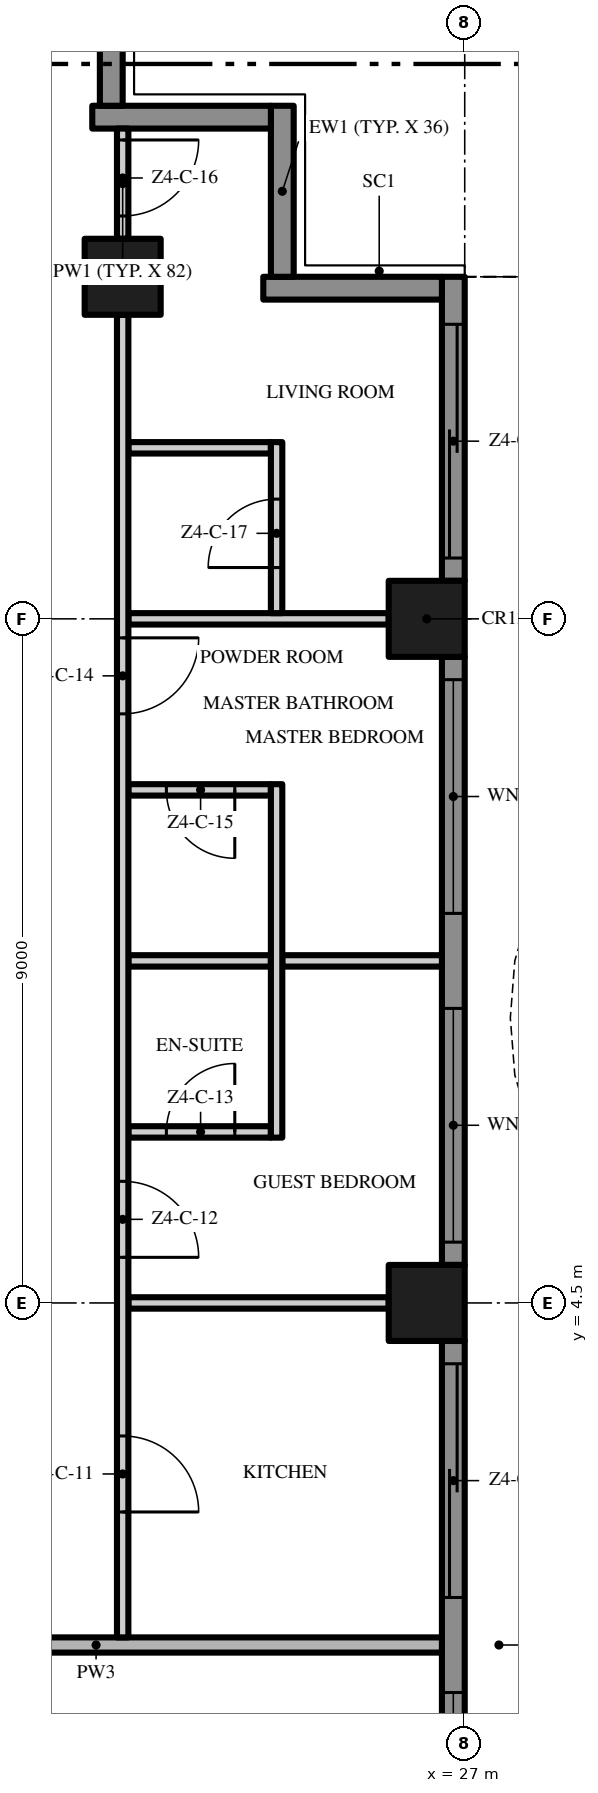
"""IFC4 building model, lengths in metres.
Left out: names, types, materials, properties, quantities, classifications, styles, units other than length and angle.
Written with IfcOpenShell. Run it as: python <this file> out.ifc"""

import sys

from ifc_helpers import new_model, si_unit, direction, frame, frame_2d, origin, origin_2d, place, context, subcontext, project, spatial, polyline, rectangle, outline, extrude, element, fill, save


model = new_model("IFC4")
c1 = context("Model", 3, precision=1e-05, world=origin(), true_north=direction((0.0, 1.0)))
c2 = subcontext(c1, "Body", "Model", "MODEL_VIEW")
j1 = project(units=[si_unit("LENGTHUNIT", "METRE"), si_unit("PLANEANGLEUNIT", "RADIAN")], contexts=[c1])
p1 = place(None, origin())
s1 = spatial("IfcSite", under=j1, at=p1, CompositionType="ELEMENT")
p2 = place(p1, origin())
s2 = spatial("IfcBuilding", under=s1, at=p2, CompositionType="ELEMENT")
p3 = place(p2, frame((0.0, 0.0, 211.0)))
s3 = spatial("IfcBuildingStorey", under=s2, at=p3, CompositionType="ELEMENT", Elevation=211.0)
for number, where, z_axis, x_axis in (
    (1, (26.5, 13.5, 0.0), (0.0, 0.0, 1.0), (1.0, 0.0, 0.0)),
    (2, (22.5, 18.0, 0.0), (0.0, 0.0, 1.0), (1.0, 0.0, 0.0)),
    (3, (26.5, 4.5, 0.0), (0.0, 0.0, 1.0), (1.0, 0.0, 0.0)),
):
    element("IfcColumn", number, at=place(p3, frame(where, z_axis=z_axis, x_axis=x_axis)), inside=s3, PredefinedType="COLUMN", context=c2, shape_type="SweptSolid", body=[
        extrude(rectangle(XDim=1.0, YDim=1.0, at=origin_2d()), origin(), (0.0, 0.0, 1.0), 3.5),
    ])
p4 = place(p3, frame((26.85, 4.0, 0.0), z_axis=(0.0, 0.0, 1.0), x_axis=(0.0, -1.0, 0.0)))
e4 = element("IfcWall", 4, at=p4, inside=s3, PredefinedType="SOLIDWALL", context=c2, shape_type="SweptSolid", body=[
    extrude(rectangle(XDim=8.0, YDim=0.3, at=frame_2d((4.0, 0.0))), origin(), (0.0, 0.0, 1.0), 3.5),
])
p5 = place(p4, frame((4.625, 0.0, 0.45)))
e5 = element("IfcOpeningElement", 5, at=p5, cuts=e4, PredefinedType="OPENING", context=c2, shape_type="SweptSolid", body=[
    extrude(rectangle(XDim=3.075, YDim=2.65, at=frame_2d((1.538, 1.325))), frame((0.0, 0.16, 0.0), z_axis=(0.0, -1.0, 0.0), x_axis=(1.0, 0.0, 0.0)), (0.0, 0.0, 1.0), 0.32),
])
p6 = place(p4, frame((0.3, 0.0, 0.0)))
e6 = element("IfcOpeningElement", 6, at=p6, cuts=e4, PredefinedType="OPENING", context=c2, shape_type="SweptSolid", body=[
    extrude(rectangle(XDim=3.075, YDim=2.4, at=frame_2d((1.538, 1.2))), frame((0.0, 0.16, 0.0), z_axis=(0.0, -1.0, 0.0), x_axis=(1.0, 0.0, 0.0)), (0.0, 0.0, 1.0), 0.32),
])
p7 = place(p3, frame((26.85, 13.0, 0.0), z_axis=(0.0, 0.0, 1.0), x_axis=(0.0, -1.0, 0.0)))
e7 = element("IfcWall", 7, at=p7, inside=s3, PredefinedType="SOLIDWALL", context=c2, shape_type="SweptSolid", body=[
    extrude(rectangle(XDim=8.0, YDim=0.3, at=frame_2d((4.0, 0.0))), origin(), (0.0, 0.0, 1.0), 3.5),
])
p8 = place(p7, frame((4.625, 0.0, 0.45)))
e8 = element("IfcOpeningElement", 8, at=p8, cuts=e7, PredefinedType="OPENING", context=c2, shape_type="SweptSolid", body=[
    extrude(rectangle(XDim=3.075, YDim=2.65, at=frame_2d((1.538, 1.325))), frame((0.0, 0.16, 0.0), z_axis=(0.0, -1.0, 0.0), x_axis=(1.0, 0.0, 0.0)), (0.0, 0.0, 1.0), 0.32),
])
p9 = place(p7, frame((0.3, 0.0, 0.45)))
e9 = element("IfcOpeningElement", 9, at=p9, cuts=e7, PredefinedType="OPENING", context=c2, shape_type="SweptSolid", body=[
    extrude(rectangle(XDim=3.075, YDim=2.65, at=frame_2d((1.538, 1.325))), frame((0.0, 0.16, 0.0), z_axis=(0.0, -1.0, 0.0), x_axis=(1.0, 0.0, 0.0)), (0.0, 0.0, 1.0), 0.32),
])
p10 = place(p3, frame((26.85, 18.0, 0.0), z_axis=(0.0, 0.0, 1.0), x_axis=(0.0, -1.0, 0.0)))
e10 = element("IfcWall", 10, at=p10, inside=s3, PredefinedType="SOLIDWALL", context=c2, shape_type="SweptSolid", body=[
    extrude(rectangle(XDim=4.0, YDim=0.3, at=frame_2d((2.0, 0.0))), origin(), (0.0, 0.0, 1.0), 3.5),
])
p11 = place(p10, frame((0.625, 0.0, 0.0)))
e11 = element("IfcOpeningElement", 11, at=p11, cuts=e10, PredefinedType="OPENING", context=c2, shape_type="SweptSolid", body=[
    extrude(rectangle(XDim=3.075, YDim=2.4, at=frame_2d((1.538, 1.2))), frame((0.0, 0.16, 0.0), z_axis=(0.0, -1.0, 0.0), x_axis=(1.0, 0.0, 0.0)), (0.0, 0.0, 1.0), 0.32),
])
p12 = place(p3, frame((24.35, 17.85, 0.0), z_axis=(0.0, 0.0, 1.0), x_axis=(1.0, 0.0, 0.0)))
e12 = element("IfcWall", 12, at=p12, inside=s3, PredefinedType="SOLIDWALL", context=c2, shape_type="SweptSolid", body=[
    extrude(rectangle(XDim=2.35, YDim=0.3, at=frame_2d((1.175, 0.0))), origin(), (0.0, 0.0, 1.0), 3.5),
])
p13 = place(p3, frame((24.6, 20.25, 0.0), z_axis=(0.0, 0.0, 1.0), x_axis=(0.0, -1.0, 0.0)))
e13 = element("IfcWall", 13, at=p13, inside=s3, PredefinedType="SOLIDWALL", context=c2, shape_type="SweptSolid", body=[
    extrude(rectangle(XDim=2.25, YDim=0.3, at=frame_2d((1.125, 0.0))), origin(), (0.0, 0.0, 1.0), 3.5),
])
p14 = place(p3, frame((22.1, 20.1, 0.0), z_axis=(0.0, 0.0, 1.0), x_axis=(1.0, 0.0, 0.0)))
e14 = element("IfcWall", 14, at=p14, inside=s3, PredefinedType="SOLIDWALL", context=c2, shape_type="SweptSolid", body=[
    extrude(rectangle(XDim=2.35, YDim=0.3, at=frame_2d((1.175, 0.0))), origin(), (0.0, 0.0, 1.0), 3.5),
])
p15 = place(p3, frame((22.35, 22.5, 0.0), z_axis=(0.0, 0.0, 1.0), x_axis=(0.0, -1.0, 0.0)))
e15 = element("IfcWall", 15, at=p15, inside=s3, PredefinedType="SOLIDWALL", context=c2, shape_type="SweptSolid", body=[
    extrude(rectangle(XDim=2.25, YDim=0.3, at=frame_2d((1.125, 0.0))), origin(), (0.0, 0.0, 1.0), 3.5),
])
p16 = place(p3, origin())
e16 = element("IfcWall", 16, at=p16, inside=s3, PredefinedType="USERDEFINED", context=c2, shape_type="SweptSolid", body=[
    extrude(outline(polyline([(28.8, -18.0), (29.505, -16.5), (29.941, -15.0), (30.0, -14.25), (29.941, -13.5), (29.505, -12.0), (28.8, -10.5), (28.095, -9.0), (27.659, -7.5), (27.6, -6.75), (27.659, -6.0), (28.095, -4.5), (28.8, -3.0), (29.505, -1.5), (29.941, 0.0), (30.0, 0.75), (29.941, 1.5), (29.505, 3.0), (28.8, 4.5), (28.095, 6.0), (27.659, 7.5), (27.6, 8.25), (27.659, 9.0), (28.095, 10.5), (28.8, 12.0), (29.505, 13.5), (29.941, 15.0), (30.0, 15.75), (29.941, 16.5), (29.505, 18.0), (29.265, 17.93), (29.694, 16.455), (29.749, 15.75), (29.694, 15.045), (29.271, 13.589), (28.574, 12.106), (27.86, 10.589), (27.411, 9.045), (27.349, 8.25), (27.411, 7.455), (27.86, 5.911), (28.574, 4.394), (29.271, 2.911), (29.694, 1.455), (29.749, 0.75), (29.694, 0.045), (29.271, -1.411), (28.574, -2.894), (27.86, -4.411), (27.411, -5.955), (27.349, -6.75), (27.411, -7.545), (27.86, -9.089), (28.574, -10.606), (29.271, -12.089), (29.694, -13.545), (29.749, -14.25), (29.694, -14.955), (29.271, -16.411), (28.574, -17.894), (28.8, -18.0)])), origin(), (0.0, 0.0, 1.0), 0.9),
])
p17 = place(p3, frame((17.6, 0.0, 0.0), z_axis=(0.0, 0.0, 1.0), x_axis=(1.0, 0.0, 0.0)))
e17 = element("IfcWall", 17, at=p17, inside=s3, PredefinedType="PARTITIONING", context=c2, shape_type="SweptSolid", body=[
    extrude(rectangle(XDim=9.1, YDim=0.2, at=frame_2d((4.55, 0.0))), origin(), (0.0, 0.0, 1.0), 3.5),
])
p18 = place(p3, frame((22.575, 4.5, 0.0), z_axis=(0.0, 0.0, 1.0), x_axis=(1.0, 0.0, 0.0)))
e18 = element("IfcWall", 18, at=p18, inside=s3, PredefinedType="PARTITIONING", context=c2, shape_type="SweptSolid", body=[
    extrude(rectangle(XDim=3.425, YDim=0.15, at=frame_2d((1.712, 0.0))), origin(), (0.0, 0.0, 1.0), 3.5),
])
p19 = place(p3, frame((22.575, 6.75, 0.0), z_axis=(0.0, 0.0, 1.0), x_axis=(1.0, 0.0, 0.0)))
e19 = element("IfcWall", 19, at=p19, inside=s3, PredefinedType="PARTITIONING", context=c2, shape_type="SweptSolid", body=[
    extrude(rectangle(XDim=1.875, YDim=0.15, at=frame_2d((0.938, 0.0))), origin(), (0.0, 0.0, 1.0), 3.5),
])
p20 = place(p19, frame((0.5, 0.0, 0.0)))
e20 = element("IfcOpeningElement", 20, at=p20, cuts=e19, PredefinedType="OPENING", context=c2, shape_type="SweptSolid", body=[
    extrude(rectangle(XDim=0.9, YDim=2.1, at=frame_2d((0.45, 1.05))), frame((0.0, 0.085, 0.0), z_axis=(0.0, -1.0, 0.0), x_axis=(1.0, 0.0, 0.0)), (0.0, 0.0, 1.0), 0.17),
])
p21 = place(p3, frame((22.575, 9.0, 0.0), z_axis=(0.0, 0.0, 1.0), x_axis=(1.0, 0.0, 0.0)))
e21 = element("IfcWall", 21, at=p21, inside=s3, PredefinedType="PARTITIONING", context=c2, shape_type="SweptSolid", body=[
    extrude(rectangle(XDim=1.875, YDim=0.15, at=frame_2d((0.938, 0.0))), origin(), (0.0, 0.0, 1.0), 3.5),
])
p22 = place(p3, frame((24.6, 9.0, 0.0), z_axis=(0.0, 0.0, 1.0), x_axis=(1.0, 0.0, 0.0)))
e22 = element("IfcWall", 22, at=p22, inside=s3, PredefinedType="PARTITIONING", context=c2, shape_type="SweptSolid", body=[
    extrude(rectangle(XDim=2.1, YDim=0.15, at=frame_2d((1.05, 0.0))), origin(), (0.0, 0.0, 1.0), 3.5),
])
p23 = place(p3, frame((24.45, 11.25, 0.0), z_axis=(0.0, 0.0, 1.0), x_axis=(-1.0, 0.0, 0.0)))
e23 = element("IfcWall", 23, at=p23, inside=s3, PredefinedType="PARTITIONING", context=c2, shape_type="SweptSolid", body=[
    extrude(rectangle(XDim=1.875, YDim=0.15, at=frame_2d((0.938, 0.0))), origin(), (0.0, 0.0, 1.0), 3.5),
])
p24 = place(p23, frame((0.475, 0.0, 0.0)))
e24 = element("IfcOpeningElement", 24, at=p24, cuts=e23, PredefinedType="OPENING", context=c2, shape_type="SweptSolid", body=[
    extrude(rectangle(XDim=0.9, YDim=2.1, at=frame_2d((0.45, 1.05))), frame((0.0, 0.085, 0.0), z_axis=(0.0, -1.0, 0.0), x_axis=(1.0, 0.0, 0.0)), (0.0, 0.0, 1.0), 0.17),
])
p25 = place(p3, frame((22.575, 13.5, 0.0), z_axis=(0.0, 0.0, 1.0), x_axis=(1.0, 0.0, 0.0)))
e25 = element("IfcWall", 25, at=p25, inside=s3, PredefinedType="PARTITIONING", context=c2, shape_type="SweptSolid", body=[
    extrude(rectangle(XDim=3.425, YDim=0.15, at=frame_2d((1.712, 0.0))), origin(), (0.0, 0.0, 1.0), 3.5),
])
p26 = place(p3, frame((22.575, 15.75, 0.0), z_axis=(0.0, 0.0, 1.0), x_axis=(1.0, 0.0, 0.0)))
e26 = element("IfcWall", 26, at=p26, inside=s3, PredefinedType="PARTITIONING", context=c2, shape_type="SweptSolid", body=[
    extrude(rectangle(XDim=1.875, YDim=0.15, at=frame_2d((0.938, 0.0))), origin(), (0.0, 0.0, 1.0), 3.5),
])
p27 = place(p3, frame((22.5, 17.5, 0.0), z_axis=(0.0, 0.0, 1.0), x_axis=(0.0, -1.0, 0.0)))
e27 = element("IfcWall", 27, at=p27, inside=s3, PredefinedType="PARTITIONING", context=c2, shape_type="SweptSolid", body=[
    extrude(rectangle(XDim=17.4, YDim=0.15, at=frame_2d((8.7, 0.0))), origin(), (0.0, 0.0, 1.0), 3.5),
])
p28 = place(p27, frame((14.75, 0.0, 0.0)))
e28 = element("IfcOpeningElement", 28, at=p28, cuts=e27, PredefinedType="OPENING", context=c2, shape_type="SweptSolid", body=[
    extrude(rectangle(XDim=1.0, YDim=2.4, at=frame_2d((0.5, 1.2))), frame((0.0, 0.085, 0.0), z_axis=(0.0, -1.0, 0.0), x_axis=(1.0, 0.0, 0.0)), (0.0, 0.0, 1.0), 0.17),
])
p29 = place(p27, frame((11.4, 0.0, 0.0)))
e29 = element("IfcOpeningElement", 29, at=p29, cuts=e27, PredefinedType="OPENING", context=c2, shape_type="SweptSolid", body=[
    extrude(rectangle(XDim=1.0, YDim=2.4, at=frame_2d((0.5, 1.2))), frame((0.0, 0.085, 0.0), z_axis=(0.0, -1.0, 0.0), x_axis=(1.0, 0.0, 0.0)), (0.0, 0.0, 1.0), 0.17),
])
p30 = place(p27, frame((4.25, 0.0, 0.0)))
e30 = element("IfcOpeningElement", 30, at=p30, cuts=e27, PredefinedType="OPENING", context=c2, shape_type="SweptSolid", body=[
    extrude(rectangle(XDim=1.0, YDim=2.4, at=frame_2d((0.5, 1.2))), frame((0.0, 0.085, 0.0), z_axis=(0.0, -1.0, 0.0), x_axis=(1.0, 0.0, 0.0)), (0.0, 0.0, 1.0), 0.17),
])
p31 = place(p3, frame((22.5, 19.95, 0.0), z_axis=(0.0, 0.0, 1.0), x_axis=(0.0, -1.0, 0.0)))
e31 = element("IfcWall", 31, at=p31, inside=s3, PredefinedType="PARTITIONING", context=c2, shape_type="SweptSolid", body=[
    extrude(rectangle(XDim=1.45, YDim=0.15, at=frame_2d((0.725, 0.0))), origin(), (0.0, 0.0, 1.0), 3.5),
])
p32 = place(p31, frame((0.15, 0.0, 0.0)))
e32 = element("IfcOpeningElement", 32, at=p32, cuts=e31, PredefinedType="OPENING", context=c2, shape_type="SweptSolid", body=[
    extrude(rectangle(XDim=1.0, YDim=2.4, at=frame_2d((0.5, 1.2))), frame((0.0, 0.085, 0.0), z_axis=(0.0, -1.0, 0.0), x_axis=(1.0, 0.0, 0.0)), (0.0, 0.0, 1.0), 0.17),
])
p33 = place(p3, frame((24.525, 6.675, 0.0), z_axis=(0.0, 0.0, 1.0), x_axis=(0.0, 1.0, 0.0)))
e33 = element("IfcWall", 33, at=p33, inside=s3, PredefinedType="PARTITIONING", context=c2, shape_type="SweptSolid", body=[
    extrude(rectangle(XDim=4.65, YDim=0.15, at=frame_2d((2.325, 0.0))), origin(), (0.0, 0.0, 1.0), 3.5),
])
p34 = place(p3, frame((24.525, 13.575, 0.0), z_axis=(0.0, 0.0, 1.0), x_axis=(0.0, 1.0, 0.0)))
e34 = element("IfcWall", 34, at=p34, inside=s3, PredefinedType="PARTITIONING", context=c2, shape_type="SweptSolid", body=[
    extrude(rectangle(XDim=2.25, YDim=0.15, at=frame_2d((1.125, 0.0))), origin(), (0.0, 0.0, 1.0), 3.5),
])
p35 = place(p34, frame((0.6, 0.0, 0.0)))
e35 = element("IfcOpeningElement", 35, at=p35, cuts=e34, PredefinedType="OPENING", context=c2, shape_type="SweptSolid", body=[
    extrude(rectangle(XDim=0.9, YDim=2.1, at=frame_2d((0.45, 1.05))), frame((0.0, 0.085, 0.0), z_axis=(0.0, -1.0, 0.0), x_axis=(1.0, 0.0, 0.0)), (0.0, 0.0, 1.0), 0.17),
])
p36 = place(p5, origin())
e36 = element("IfcWindow", 36, at=p36, inside=s3, PartitioningType="SINGLE_PANEL", PredefinedType="WINDOW", context=c2, shape_type="SweptSolid", body=[
    extrude(rectangle(XDim=3.075, YDim=2.65, at=frame_2d((1.538, 1.325))), frame((0.0, 0.03, 0.0), z_axis=(0.0, -1.0, 0.0), x_axis=(1.0, 0.0, 0.0)), (0.0, 0.0, 1.0), 0.06),
])
fill(e5, e36)
p37 = place(p6, origin())
e37 = element("IfcDoor", 37, at=p37, inside=s3, OperationType="SINGLE_SWING_LEFT", PredefinedType="DOOR", context=c2, shape_type="SweptSolid", body=[
    extrude(rectangle(XDim=3.075, YDim=2.4, at=frame_2d((1.538, 1.2))), frame((0.0, 0.025, 0.0), z_axis=(0.0, -1.0, 0.0), x_axis=(1.0, 0.0, 0.0)), (0.0, 0.0, 1.0), 0.05),
])
fill(e6, e37)
p38 = place(p8, origin())
e38 = element("IfcWindow", 38, at=p38, inside=s3, PartitioningType="SINGLE_PANEL", PredefinedType="WINDOW", context=c2, shape_type="SweptSolid", body=[
    extrude(rectangle(XDim=3.075, YDim=2.65, at=frame_2d((1.538, 1.325))), frame((0.0, 0.03, 0.0), z_axis=(0.0, -1.0, 0.0), x_axis=(1.0, 0.0, 0.0)), (0.0, 0.0, 1.0), 0.06),
])
fill(e8, e38)
p39 = place(p9, origin())
e39 = element("IfcWindow", 39, at=p39, inside=s3, PartitioningType="SINGLE_PANEL", PredefinedType="WINDOW", context=c2, shape_type="SweptSolid", body=[
    extrude(rectangle(XDim=3.075, YDim=2.65, at=frame_2d((1.538, 1.325))), frame((0.0, 0.03, 0.0), z_axis=(0.0, -1.0, 0.0), x_axis=(1.0, 0.0, 0.0)), (0.0, 0.0, 1.0), 0.06),
])
fill(e9, e39)
p40 = place(p11, origin())
e40 = element("IfcDoor", 40, at=p40, inside=s3, OperationType="SINGLE_SWING_LEFT", PredefinedType="DOOR", context=c2, shape_type="SweptSolid", body=[
    extrude(rectangle(XDim=3.075, YDim=2.4, at=frame_2d((1.538, 1.2))), frame((0.0, 0.025, 0.0), z_axis=(0.0, -1.0, 0.0), x_axis=(1.0, 0.0, 0.0)), (0.0, 0.0, 1.0), 0.05),
])
fill(e11, e40)
p41 = place(p28, origin())
e41 = element("IfcDoor", 41, at=p41, inside=s3, OperationType="SINGLE_SWING_RIGHT", PredefinedType="DOOR", context=c2, shape_type="SweptSolid", body=[
    extrude(rectangle(XDim=1.0, YDim=2.4, at=frame_2d((0.5, 1.2))), frame((0.0, 0.025, 0.0), z_axis=(0.0, -1.0, 0.0), x_axis=(1.0, 0.0, 0.0)), (0.0, 0.0, 1.0), 0.05),
])
fill(e28, e41)
p42 = place(p29, origin())
e42 = element("IfcDoor", 42, at=p42, inside=s3, OperationType="SINGLE_SWING_RIGHT", PredefinedType="DOOR", context=c2, shape_type="SweptSolid", body=[
    extrude(rectangle(XDim=1.0, YDim=2.4, at=frame_2d((0.5, 1.2))), frame((0.0, 0.025, 0.0), z_axis=(0.0, -1.0, 0.0), x_axis=(1.0, 0.0, 0.0)), (0.0, 0.0, 1.0), 0.05),
])
fill(e29, e42)
p43 = place(p20, origin())
e43 = element("IfcDoor", 43, at=p43, inside=s3, OperationType="SINGLE_SWING_RIGHT", PredefinedType="DOOR", context=c2, shape_type="SweptSolid", body=[
    extrude(rectangle(XDim=0.9, YDim=2.1, at=frame_2d((0.45, 1.05))), frame((0.0, 0.025, 0.0), z_axis=(0.0, -1.0, 0.0), x_axis=(1.0, 0.0, 0.0)), (0.0, 0.0, 1.0), 0.05),
])
fill(e20, e43)
p44 = place(p30, origin())
e44 = element("IfcDoor", 44, at=p44, inside=s3, OperationType="SINGLE_SWING_LEFT", PredefinedType="DOOR", context=c2, shape_type="SweptSolid", body=[
    extrude(rectangle(XDim=1.0, YDim=2.4, at=frame_2d((0.5, 1.2))), frame((0.0, 0.025, 0.0), z_axis=(0.0, -1.0, 0.0), x_axis=(1.0, 0.0, 0.0)), (0.0, 0.0, 1.0), 0.05),
])
fill(e30, e44)
p45 = place(p24, origin())
e45 = element("IfcDoor", 45, at=p45, inside=s3, OperationType="SINGLE_SWING_LEFT", PredefinedType="DOOR", context=c2, shape_type="SweptSolid", body=[
    extrude(rectangle(XDim=0.9, YDim=2.1, at=frame_2d((0.45, 1.05))), frame((0.0, 0.025, 0.0), z_axis=(0.0, -1.0, 0.0), x_axis=(1.0, 0.0, 0.0)), (0.0, 0.0, 1.0), 0.05),
])
fill(e24, e45)
p46 = place(p32, origin())
e46 = element("IfcDoor", 46, at=p46, inside=s3, OperationType="SINGLE_SWING_LEFT", PredefinedType="DOOR", context=c2, shape_type="SweptSolid", body=[
    extrude(rectangle(XDim=1.0, YDim=2.4, at=frame_2d((0.5, 1.2))), frame((0.0, 0.025, 0.0), z_axis=(0.0, -1.0, 0.0), x_axis=(1.0, 0.0, 0.0)), (0.0, 0.0, 1.0), 0.05),
])
fill(e32, e46)
p47 = place(p35, origin())
e47 = element("IfcDoor", 47, at=p47, inside=s3, OperationType="SINGLE_SWING_LEFT", PredefinedType="DOOR", context=c2, shape_type="SweptSolid", body=[
    extrude(rectangle(XDim=0.9, YDim=2.1, at=frame_2d((0.45, 1.05))), frame((0.0, 0.025, 0.0), z_axis=(0.0, -1.0, 0.0), x_axis=(1.0, 0.0, 0.0)), (0.0, 0.0, 1.0), 0.05),
])
fill(e35, e47)
save(model, sys.argv[1])
